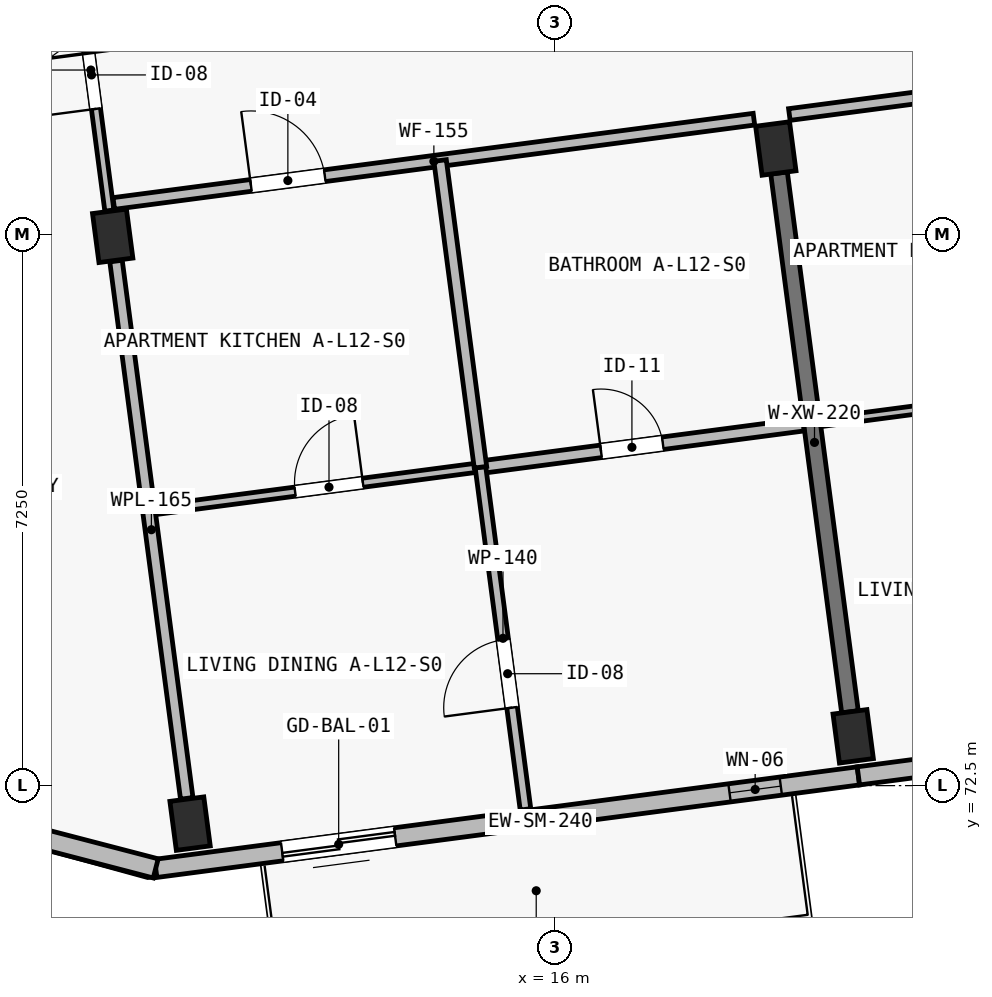
"""IFC4 building model, lengths in metres.
Left out: names, types, materials, properties, quantities, classifications, styles, units other than length and angle.
Written with IfcOpenShell. Run it as: python <this file> out.ifc"""

import sys

from ifc_helpers import new_model, si_unit, direction, frame, frame_2d, origin, origin_2d, place, context, subcontext, project, spatial, rectangle, extrude, element, fill, save


model = new_model("IFC4")
c1 = context("Model", 3, precision=1e-05, world=origin(), true_north=direction((0.0, 1.0)))
c2 = subcontext(c1, "Body", "Model", "MODEL_VIEW")
j1 = project(units=[si_unit("LENGTHUNIT", "METRE"), si_unit("PLANEANGLEUNIT", "RADIAN")], contexts=[c1])
p1 = place(None, origin())
s1 = spatial("IfcSite", under=j1, at=p1, CompositionType="ELEMENT")
p2 = place(p1, origin())
s2 = spatial("IfcBuilding", under=s1, at=p2, CompositionType="ELEMENT")
p3 = place(p2, frame((0.0, 0.0, 40.9)))
s3 = spatial("IfcBuildingStorey", under=s2, at=p3, CompositionType="ELEMENT", Elevation=40.9)
for number, where, z_axis, x_axis in (
    (1, (11.2, 72.0, 0.0), (0.0, 0.0, 1.0), (0.991, 0.131, 0.0)),
    (2, (10.182, 79.733, 0.0), (0.0, 0.0, 1.0), (0.991, 0.131, 0.0)),
    (3, (19.925, 73.149, 0.0), (0.0, 0.0, 1.0), (0.991, 0.131, 0.0)),
    (4, (18.906, 80.882, 0.0), (0.0, 0.0, 1.0), (0.991, 0.131, 0.0)),
):
    element("IfcColumn", number, at=place(p3, frame(where, z_axis=z_axis, x_axis=x_axis)), inside=s3, PredefinedType="COLUMN", context=c2, shape_type="SweptSolid", body=[
        extrude(rectangle(XDim=0.45, YDim=0.65, at=origin_2d()), origin(), (0.0, 0.0, 1.0), 3.25),
    ])
p4 = place(p3, frame((19.882, 73.471, 0.0), z_axis=(0.0, 0.0, 1.0), x_axis=(-0.130541958643, 0.991442785557, 0.0)))
e5 = element("IfcWall", 5, at=p4, inside=s3, PredefinedType="SHEAR", context=c2, shape_type="SweptSolid", body=[
    extrude(rectangle(XDim=7.15, YDim=0.22, at=frame_2d((3.575, 0.0))), origin(), (0.0, 0.0, 1.0), 2.5),
])
p5 = place(p3, frame((19.993, 72.628, 0.0), z_axis=(0.0, 0.0, 1.0), x_axis=(-0.991442885224, -0.130541201693, 0.0)))
e6 = element("IfcWall", 6, at=p5, inside=s3, PredefinedType="SOLIDWALL", context=c2, shape_type="SweptSolid", body=[
    extrude(rectangle(XDim=9.325, YDim=0.24, at=frame_2d((4.663, 0.0))), origin(), (0.0, 0.0, 1.0), 3.0),
])
p6 = place(p5, frame((6.147, 0.0, 0.0)))
e7 = element("IfcOpeningElement", 7, at=p6, cuts=e6, PredefinedType="OPENING", context=c2, shape_type="SweptSolid", body=[
    extrude(rectangle(XDim=1.5, YDim=2.12, at=frame_2d((0.75, 1.06))), frame((0.0, 0.135, 0.0), z_axis=(0.0, -1.0, 0.0), x_axis=(1.0, 0.0, 0.0)), (0.0, 0.0, 1.0), 0.27),
])
p7 = place(p5, frame((1.03, 0.0, 0.42)))
e8 = element("IfcOpeningElement", 8, at=p7, cuts=e6, PredefinedType="OPENING", context=c2, shape_type="SweptSolid", body=[
    extrude(rectangle(XDim=0.68, YDim=2.24, at=frame_2d((0.34, 1.12))), frame((0.0, 0.135, 0.0), z_axis=(0.0, -1.0, 0.0), x_axis=(1.0, 0.0, 0.0)), (0.0, 0.0, 1.0), 0.27),
])
p8 = place(p3, frame((28.718, 73.777, 0.0), z_axis=(0.0, 0.0, 1.0), x_axis=(-0.991444377792, -0.130529865336, 0.0)))
e9 = element("IfcWall", 9, at=p8, inside=s3, PredefinedType="SOLIDWALL", context=c2, shape_type="SweptSolid", body=[
    extrude(rectangle(XDim=8.8, YDim=0.24, at=frame_2d((4.4, 0.0))), origin(), (0.0, 0.0, 1.0), 3.0),
])
p9 = place(p8, frame((0.61, 0.0, 0.48)))
e10 = element("IfcOpeningElement", 10, at=p9, cuts=e9, PredefinedType="OPENING", context=c2, shape_type="SweptSolid", body=[
    extrude(rectangle(XDim=0.66, YDim=2.32, at=frame_2d((0.33, 1.16))), frame((0.0, 0.135, 0.0), z_axis=(0.0, -1.0, 0.0), x_axis=(1.0, 0.0, 0.0)), (0.0, 0.0, 1.0), 0.27),
])
p10 = place(p8, frame((2.516, 0.0, 0.52)))
e11 = element("IfcOpeningElement", 11, at=p10, cuts=e9, PredefinedType="OPENING", context=c2, shape_type="SweptSolid", body=[
    extrude(rectangle(XDim=0.68, YDim=2.24, at=frame_2d((0.34, 1.12))), frame((0.0, 0.135, 0.0), z_axis=(0.0, -1.0, 0.0), x_axis=(1.0, 0.0, 0.0)), (0.0, 0.0, 1.0), 0.27),
])
p11 = place(p8, frame((6.895, 0.0, 0.48)))
e12 = element("IfcOpeningElement", 12, at=p11, cuts=e9, PredefinedType="OPENING", context=c2, shape_type="SweptSolid", body=[
    extrude(rectangle(XDim=0.72, YDim=2.16, at=frame_2d((0.36, 1.08))), frame((0.0, 0.135, 0.0), z_axis=(0.0, -1.0, 0.0), x_axis=(1.0, 0.0, 0.0)), (0.0, 0.0, 1.0), 0.27),
])
p12 = place(p3, frame((10.748, 71.411, 0.0), z_axis=(0.0, 0.0, 1.0), x_axis=(-0.967694955113, 0.252123925577, 0.0)))
e13 = element("IfcWall", 13, at=p12, inside=s3, PredefinedType="SOLIDWALL", context=c2, shape_type="SweptSolid", body=[
    extrude(rectangle(XDim=8.305, YDim=0.26, at=frame_2d((4.153, 0.0))), origin(), (0.0, 0.0, 1.0), 3.0),
])
p13 = place(p12, frame((2.45, 0.0, 0.45)))
e14 = element("IfcOpeningElement", 14, at=p13, cuts=e13, PredefinedType="OPENING", context=c2, shape_type="SweptSolid", body=[
    extrude(rectangle(XDim=0.6, YDim=2.22, at=frame_2d((0.3, 1.11))), frame((0.0, 0.145, 0.0), z_axis=(0.0, -1.0, 0.0), x_axis=(1.0, 0.0, 0.0)), (0.0, 0.0, 1.0), 0.29),
])
p14 = place(p12, frame((5.115, 0.0, 0.52)))
e15 = element("IfcOpeningElement", 15, at=p14, cuts=e13, PredefinedType="OPENING", context=c2, shape_type="SweptSolid", body=[
    extrude(rectangle(XDim=0.74, YDim=2.26, at=frame_2d((0.37, 1.13))), frame((0.0, 0.145, 0.0), z_axis=(0.0, -1.0, 0.0), x_axis=(1.0, 0.0, 0.0)), (0.0, 0.0, 1.0), 0.29),
])
p15 = place(p3, frame((10.138, 80.065, 0.0), z_axis=(0.0, 0.0, 1.0), x_axis=(-0.130517160134, 0.991446050429, 0.0)))
e16 = element("IfcWall", 16, at=p15, inside=s3, PredefinedType="PARTITIONING", context=c2, shape_type="SweptSolid", body=[
    extrude(rectangle(XDim=3.73, YDim=0.12, at=frame_2d((1.865, 0.0))), origin(), (0.0, 0.0, 1.0), 2.5),
])
p16 = place(p15, frame((1.35, 0.0, 0.0)))
e17 = element("IfcOpeningElement", 17, at=p16, cuts=e16, PredefinedType="OPENING", context=c2, shape_type="SweptSolid", body=[
    extrude(rectangle(XDim=0.9, YDim=2.1, at=frame_2d((0.45, 1.05))), frame((0.0, 0.075, 0.0), z_axis=(0.0, -1.0, 0.0), x_axis=(1.0, 0.0, 0.0)), (0.0, 0.0, 1.0), 0.15),
])
p17 = place(p3, frame((11.156, 72.332, 0.0), z_axis=(0.0, 0.0, 1.0), x_axis=(-0.130526257258, 0.991444852811, 0.0)))
e18 = element("IfcWall", 18, at=p17, inside=s3, PredefinedType="PLUMBINGWALL", context=c2, shape_type="SweptSolid", body=[
    extrude(rectangle(XDim=7.13, YDim=0.165, at=frame_2d((3.565, 0.0))), origin(), (0.0, 0.0, 1.0), 2.5),
])
p18 = place(p3, frame((10.197, 80.159, 0.0), z_axis=(0.0, 0.0, 1.0), x_axis=(0.991447642549, 0.130505065361, 0.0)))
e19 = element("IfcWall", 19, at=p18, inside=s3, PredefinedType="PARTITIONING", context=c2, shape_type="SweptSolid", body=[
    extrude(rectangle(XDim=8.495, YDim=0.155, at=frame_2d((4.248, 0.0))), origin(), (0.0, 0.0, 1.0), 2.97),
])
p19 = place(p18, frame((1.82, 0.0, 0.0)))
e20 = element("IfcOpeningElement", 20, at=p19, cuts=e19, PredefinedType="OPENING", context=c2, shape_type="SweptSolid", body=[
    extrude(rectangle(XDim=0.98, YDim=2.15, at=frame_2d((0.49, 1.075))), frame((0.0, 0.093, 0.0), z_axis=(0.0, -1.0, 0.0), x_axis=(1.0, 0.0, 0.0)), (0.0, 0.0, 1.0), 0.185),
])
p20 = place(p3, frame((10.748, 76.126, 0.0), z_axis=(0.0, 0.0, 1.0), x_axis=(0.991447160489, 0.130508727519, 0.0)))
e21 = element("IfcWall", 21, at=p20, inside=s3, PredefinedType="PARTITIONING", context=c2, shape_type="SweptSolid", body=[
    extrude(rectangle(XDim=4.31, YDim=0.12, at=frame_2d((2.155, 0.0))), origin(), (0.0, 0.0, 1.0), 2.97),
])
p21 = place(p20, frame((1.85, 0.0, 0.0)))
e22 = element("IfcOpeningElement", 22, at=p21, cuts=e21, PredefinedType="OPENING", context=c2, shape_type="SweptSolid", body=[
    extrude(rectangle(XDim=0.9, YDim=2.1, at=frame_2d((0.45, 1.05))), frame((0.0, 0.075, 0.0), z_axis=(0.0, -1.0, 0.0), x_axis=(1.0, 0.0, 0.0)), (0.0, 0.0, 1.0), 0.15),
])
p22 = place(p3, frame((15.021, 76.689, 0.0), z_axis=(0.0, 0.0, 1.0), x_axis=(0.991444014242, 0.130532626667, 0.0)))
e23 = element("IfcWall", 23, at=p22, inside=s3, PredefinedType="PLUMBINGWALL", context=c2, shape_type="SweptSolid", body=[
    extrude(rectangle(XDim=4.285, YDim=0.165, at=frame_2d((2.143, 0.0))), origin(), (0.0, 0.0, 1.0), 2.97),
])
p23 = place(p22, frame((1.6, 0.0, 0.0)))
e24 = element("IfcOpeningElement", 24, at=p23, cuts=e23, PredefinedType="OPENING", context=c2, shape_type="SweptSolid", body=[
    extrude(rectangle(XDim=0.82, YDim=2.08, at=frame_2d((0.41, 1.04))), frame((0.0, 0.097, 0.0), z_axis=(0.0, -1.0, 0.0), x_axis=(1.0, 0.0, 0.0)), (0.0, 0.0, 1.0), 0.195),
])
p24 = place(p3, frame((15.613, 72.188, 0.0), z_axis=(0.0, 0.0, 1.0), x_axis=(-0.130518503748, 0.99144587355, 0.0)))
e25 = element("IfcWall", 25, at=p24, inside=s3, PredefinedType="PARTITIONING", context=c2, shape_type="SweptSolid", body=[
    extrude(rectangle(XDim=4.54, YDim=0.14, at=frame_2d((2.27, 0.0))), origin(), (0.0, 0.0, 1.0), 2.97),
])
p25 = place(p24, frame((1.35, 0.0, 0.0)))
e26 = element("IfcOpeningElement", 26, at=p25, cuts=e25, PredefinedType="OPENING", context=c2, shape_type="SweptSolid", body=[
    extrude(rectangle(XDim=0.9, YDim=2.1, at=frame_2d((0.45, 1.05))), frame((0.0, 0.085, 0.0), z_axis=(0.0, -1.0, 0.0), x_axis=(1.0, 0.0, 0.0)), (0.0, 0.0, 1.0), 0.17),
])
p26 = place(p3, frame((15.021, 76.689, 0.0), z_axis=(0.0, 0.0, 1.0), x_axis=(-0.13052899417, 0.991444492486, 0.0)))
e27 = element("IfcWall", 27, at=p26, inside=s3, PredefinedType="PLUMBINGWALL", context=c2, shape_type="SweptSolid", body=[
    extrude(rectangle(XDim=4.07, YDim=0.165, at=frame_2d((2.035, 0.0))), origin(), (0.0, 0.0, 1.0), 2.97),
])
p27 = place(p3, frame((19.085, 81.329, 0.0), z_axis=(0.0, 0.0, 1.0), x_axis=(0.991446911972, 0.130510615437, 0.0)))
e28 = element("IfcWall", 28, at=p27, inside=s3, PredefinedType="PARTITIONING", context=c2, shape_type="SweptSolid", body=[
    extrude(rectangle(XDim=8.33, YDim=0.155, at=frame_2d((4.165, 0.0))), origin(), (0.0, 0.0, 1.0), 2.97),
])
p28 = place(p27, frame((1.655, 0.0, 0.0)))
e29 = element("IfcOpeningElement", 29, at=p28, cuts=e28, PredefinedType="OPENING", context=c2, shape_type="SweptSolid", body=[
    extrude(rectangle(XDim=1.02, YDim=2.2, at=frame_2d((0.51, 1.1))), frame((0.0, 0.093, 0.0), z_axis=(0.0, -1.0, 0.0), x_axis=(1.0, 0.0, 0.0)), (0.0, 0.0, 1.0), 0.185),
])
p29 = place(p3, frame((19.497, 77.278, 0.0), z_axis=(0.0, 0.0, 1.0), x_axis=(0.991444014242, 0.130532626667, 0.0)))
e30 = element("IfcWall", 30, at=p29, inside=s3, PredefinedType="PARTITIONING", context=c2, shape_type="SweptSolid", body=[
    extrude(rectangle(XDim=4.285, YDim=0.11, at=frame_2d((2.143, 0.0))), origin(), (0.0, 0.0, 1.0), 2.97),
])
p30 = place(p29, frame((1.825, 0.0, 0.0)))
e31 = element("IfcOpeningElement", 31, at=p30, cuts=e30, PredefinedType="OPENING", context=c2, shape_type="SweptSolid", body=[
    extrude(rectangle(XDim=0.9, YDim=2.1, at=frame_2d((0.45, 1.05))), frame((0.0, 0.07, 0.0), z_axis=(0.0, -1.0, 0.0), x_axis=(1.0, 0.0, 0.0)), (0.0, 0.0, 1.0), 0.14),
])
p31 = place(p6, origin())
e32 = element("IfcDoor", 32, at=p31, inside=s3, OperationType="SLIDING_TO_RIGHT", PredefinedType="DOOR", context=c2, shape_type="SweptSolid", body=[
    extrude(rectangle(XDim=1.5, YDim=2.12, at=frame_2d((0.75, 1.06))), frame((0.0, 0.025, 0.0), z_axis=(0.0, -1.0, 0.0), x_axis=(1.0, 0.0, 0.0)), (0.0, 0.0, 1.0), 0.05),
])
fill(e7, e32)
p32 = place(p7, origin())
e33 = element("IfcWindow", 33, at=p32, inside=s3, PartitioningType="SINGLE_PANEL", PredefinedType="WINDOW", context=c2, shape_type="SweptSolid", body=[
    extrude(rectangle(XDim=0.68, YDim=2.24, at=frame_2d((0.34, 1.12))), frame((0.0, 0.03, 0.0), z_axis=(0.0, -1.0, 0.0), x_axis=(1.0, 0.0, 0.0)), (0.0, 0.0, 1.0), 0.06),
])
fill(e8, e33)
p33 = place(p16, origin())
e34 = element("IfcDoor", 34, at=p33, inside=s3, OperationType="SINGLE_SWING_LEFT", PredefinedType="DOOR", context=c2, shape_type="SweptSolid", body=[
    extrude(rectangle(XDim=0.9, YDim=2.1, at=frame_2d((0.45, 1.05))), frame((0.0, 0.025, 0.0), z_axis=(0.0, -1.0, 0.0), x_axis=(1.0, 0.0, 0.0)), (0.0, 0.0, 1.0), 0.05),
])
fill(e17, e34)
p34 = place(p19, origin())
e35 = element("IfcDoor", 35, at=p34, inside=s3, OperationType="SINGLE_SWING_LEFT", PredefinedType="DOOR", context=c2, shape_type="SweptSolid", body=[
    extrude(rectangle(XDim=0.98, YDim=2.15, at=frame_2d((0.49, 1.075))), frame((0.0, 0.025, 0.0), z_axis=(0.0, -1.0, 0.0), x_axis=(1.0, 0.0, 0.0)), (0.0, 0.0, 1.0), 0.05),
])
fill(e20, e35)
p35 = place(p21, origin())
e36 = element("IfcDoor", 36, at=p35, inside=s3, OperationType="SINGLE_SWING_RIGHT", PredefinedType="DOOR", context=c2, shape_type="SweptSolid", body=[
    extrude(rectangle(XDim=0.9, YDim=2.1, at=frame_2d((0.45, 1.05))), frame((0.0, 0.025, 0.0), z_axis=(0.0, -1.0, 0.0), x_axis=(1.0, 0.0, 0.0)), (0.0, 0.0, 1.0), 0.05),
])
fill(e22, e36)
p36 = place(p23, origin())
e37 = element("IfcDoor", 37, at=p36, inside=s3, OperationType="SINGLE_SWING_LEFT", PredefinedType="DOOR", context=c2, shape_type="SweptSolid", body=[
    extrude(rectangle(XDim=0.82, YDim=2.08, at=frame_2d((0.41, 1.04))), frame((0.0, 0.025, 0.0), z_axis=(0.0, -1.0, 0.0), x_axis=(1.0, 0.0, 0.0)), (0.0, 0.0, 1.0), 0.05),
])
fill(e24, e37)
p37 = place(p25, origin())
e38 = element("IfcDoor", 38, at=p37, inside=s3, OperationType="SINGLE_SWING_LEFT", PredefinedType="DOOR", context=c2, shape_type="SweptSolid", body=[
    extrude(rectangle(XDim=0.9, YDim=2.1, at=frame_2d((0.45, 1.05))), frame((0.0, 0.025, 0.0), z_axis=(0.0, -1.0, 0.0), x_axis=(1.0, 0.0, 0.0)), (0.0, 0.0, 1.0), 0.05),
])
fill(e26, e38)
save(model, sys.argv[1])
